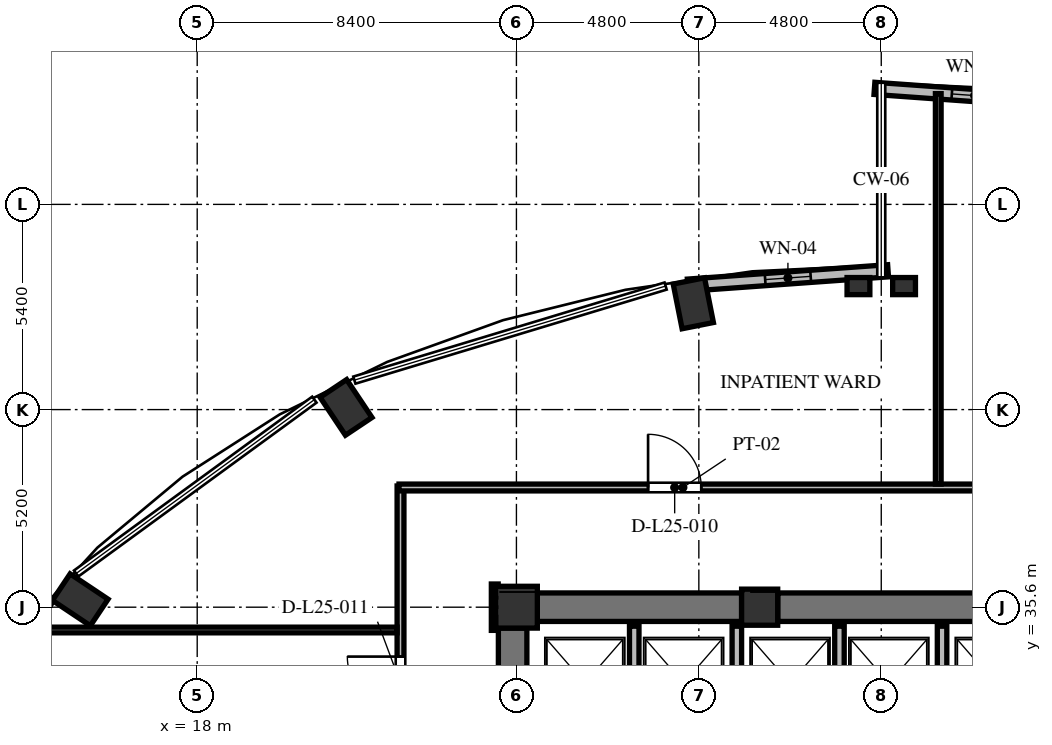
"""IFC4 building model, lengths in metres.
Left out: names, types, materials, properties, quantities, classifications, styles, units other than length and angle.
Written with IfcOpenShell. Run it as: python <this file> out.ifc"""

import sys

from ifc_helpers import new_model, si_unit, direction, frame, frame_2d, origin, origin_2d, place, context, subcontext, project, spatial, rectangle, extrude, element, fill, save


model = new_model("IFC4")
c1 = context("Model", 3, precision=1e-05, world=origin(), true_north=direction((0.0, 1.0)))
c2 = subcontext(c1, "Body", "Model", "MODEL_VIEW")
j1 = project(units=[si_unit("LENGTHUNIT", "METRE"), si_unit("PLANEANGLEUNIT", "RADIAN")], contexts=[c1])
p1 = place(None, origin())
s1 = spatial("IfcSite", under=j1, at=p1, CompositionType="ELEMENT")
p2 = place(p1, origin())
s2 = spatial("IfcBuilding", under=s1, at=p2, CompositionType="ELEMENT")
p3 = place(p2, frame((0.0, 0.0, 99.984)))
s3 = spatial("IfcBuildingStorey", under=s2, at=p3, CompositionType="ELEMENT", Elevation=99.984)
for number, where, z_axis, x_axis in (
    (1, (31.054, 43.597, 0.0), (0.0, 0.0, 1.0), (-0.195, 0.981, 0.0)),
    (2, (21.916, 40.857, 0.0), (0.0, 0.0, 1.0), (-0.556, 0.831, 0.0)),
    (3, (14.922, 35.795, 0.0), (0.0, 0.0, 1.0), (-0.831, 0.556, 0.0)),
):
    element("IfcColumn", number, at=place(p3, frame(where, z_axis=z_axis, x_axis=x_axis)), inside=s3, PredefinedType="COLUMN", context=c2, shape_type="SweptSolid", body=[
        extrude(rectangle(XDim=1.2, YDim=0.84, at=origin_2d()), origin(), (0.0, 0.0, 1.0), 3.648),
    ])
p4 = place(p3, frame((32.8, 35.6, 0.0), z_axis=(0.0, 0.0, 1.0), x_axis=(1.0, 0.0, 0.0)))
e4 = element("IfcColumn", 4, at=p4, inside=s3, PredefinedType="COLUMN", context=c2, shape_type="SweptSolid", body=[
    extrude(rectangle(XDim=0.95, YDim=0.95, at=origin_2d()), origin(), (0.0, 0.0, 1.0), 3.648),
])
p5 = place(p3, frame((26.4, 35.6, 0.0), z_axis=(0.0, 0.0, 1.0), x_axis=(1.0, 0.0, 0.0)))
e5 = element("IfcColumn", 5, at=p5, inside=s3, PredefinedType="COLUMN", context=c2, shape_type="SweptSolid", body=[
    extrude(rectangle(XDim=1.1, YDim=1.1, at=origin_2d()), origin(), (0.0, 0.0, 1.0), 3.648),
])
for number, where, z_axis, x_axis in (
    (6, (35.4, 44.05, 0.0), (0.0, 0.0, 1.0), (1.0, 0.0, 0.0)),
    (7, (36.6, 44.05, 0.0), (0.0, 0.0, 1.0), (1.0, 0.0, 0.0)),
):
    element("IfcColumn", number, at=place(p3, frame(where, z_axis=z_axis, x_axis=x_axis)), inside=s3, PredefinedType="PILASTER", context=c2, shape_type="SweptSolid", body=[
        extrude(rectangle(XDim=0.6, YDim=0.45, at=origin_2d()), origin(), (0.0, 0.0, 1.0), 3.648),
    ])
p6 = place(p3, frame((26.3, 20.95, 0.0), z_axis=(0.0, 0.0, 1.0), x_axis=(0.0, 1.0, 0.0)))
e8 = element("IfcWall", 8, at=p6, inside=s3, PredefinedType="SHEAR", context=c2, shape_type="SweptSolid", body=[
    extrude(rectangle(XDim=14.1, YDim=0.75, at=frame_2d((7.05, 0.0))), origin(), (0.0, 0.0, 1.0), 3.648),
])
p7 = place(p6, frame((6.5, 0.0, 0.0)))
e9 = element("IfcOpeningElement", 9, at=p7, cuts=e8, PredefinedType="OPENING", context=c2, shape_type="SweptSolid", body=[
    extrude(rectangle(XDim=1.2, YDim=2.15, at=frame_2d((0.6, 1.075))), frame((0.0, 0.385, 0.0), z_axis=(0.0, -1.0, 0.0), x_axis=(1.0, 0.0, 0.0)), (0.0, 0.0, 1.0), 0.77),
])
p8 = place(p6, frame((9.6, 0.0, 0.0)))
e10 = element("IfcOpeningElement", 10, at=p8, cuts=e8, PredefinedType="OPENING", context=c2, shape_type="SweptSolid", body=[
    extrude(rectangle(XDim=1.3, YDim=2.2, at=frame_2d((0.65, 1.1))), frame((0.0, 0.385, 0.0), z_axis=(0.0, -1.0, 0.0), x_axis=(1.0, 0.0, 0.0)), (0.0, 0.0, 1.0), 0.77),
])
p9 = place(p6, frame((3.26, 0.0, 0.0)))
e11 = element("IfcOpeningElement", 11, at=p9, cuts=e8, PredefinedType="OPENING", context=c2, shape_type="SweptSolid", body=[
    extrude(rectangle(XDim=1.3, YDim=2.2, at=frame_2d((0.65, 1.1))), frame((0.0, 0.385, 0.0), z_axis=(0.0, -1.0, 0.0), x_axis=(1.0, 0.0, 0.0)), (0.0, 0.0, 1.0), 0.77),
])
p10 = place(p3, frame((26.95, 35.6, 0.0), z_axis=(0.0, 0.0, 1.0), x_axis=(1.0, 0.0, 0.0)))
e12 = element("IfcWall", 12, at=p10, inside=s3, PredefinedType="SHEAR", context=c2, shape_type="SweptSolid", body=[
    extrude(rectangle(XDim=5.375, YDim=0.75, at=frame_2d((2.688, 0.0))), origin(), (0.0, 0.0, 1.0), 3.648),
])
p11 = place(p3, frame((33.275, 35.6, 0.0), z_axis=(0.0, 0.0, 1.0), x_axis=(1.0, 0.0, 0.0)))
e13 = element("IfcWall", 13, at=p11, inside=s3, PredefinedType="SHEAR", context=c2, shape_type="SweptSolid", body=[
    extrude(rectangle(XDim=5.45, YDim=0.75, at=frame_2d((2.725, 0.0))), origin(), (0.0, 0.0, 1.0), 3.648),
])
p12 = place(p3, frame((41.091, 48.875, 0.0), z_axis=(0.0, 0.0, 1.0), x_axis=(-0.997432364291, 0.071614793619, 0.0)))
e14 = element("IfcWall", 14, at=p12, inside=s3, PredefinedType="SOLIDWALL", context=c2, shape_type="SweptSolid", body=[
    extrude(rectangle(XDim=5.284, YDim=0.32, at=frame_2d((2.642, 0.0))), origin(), (0.0, 0.0, 1.0), 3.428),
])
p13 = place(p12, frame((2.042, 0.0, 0.85)))
e15 = element("IfcOpeningElement", 15, at=p13, cuts=e14, PredefinedType="OPENING", context=c2, shape_type="SweptSolid", body=[
    extrude(rectangle(XDim=1.2, YDim=2.2, at=frame_2d((0.6, 1.1))), frame((0.0, 0.17, 0.0), z_axis=(0.0, -1.0, 0.0), x_axis=(1.0, 0.0, 0.0)), (0.0, 0.0, 1.0), 0.34),
])
p14 = place(p3, frame((36.179, 44.453, 0.0), z_axis=(0.0, 0.0, 1.0), x_axis=(-0.997431890304, -0.071621394884, 0.0)))
e16 = element("IfcWall", 16, at=p14, inside=s3, PredefinedType="SOLIDWALL", context=c2, shape_type="SweptSolid", body=[
    extrude(rectangle(XDim=5.284, YDim=0.32, at=frame_2d((2.642, 0.0))), origin(), (0.0, 0.0, 1.0), 3.428),
])
p15 = place(p14, frame((2.042, 0.0, 0.85)))
e17 = element("IfcOpeningElement", 17, at=p15, cuts=e16, PredefinedType="OPENING", context=c2, shape_type="SweptSolid", body=[
    extrude(rectangle(XDim=1.2, YDim=1.8, at=frame_2d((0.6, 0.9))), frame((0.0, 0.17, 0.0), z_axis=(0.0, -1.0, 0.0), x_axis=(1.0, 0.0, 0.0)), (0.0, 0.0, 1.0), 0.34),
])
for number, where, z_axis, x_axis in (
    (18, (29.5, 32.42, 0.0), (0.0, 0.0, 1.0), (0.0, 1.0, 0.0)),
    (19, (32.2, 32.42, 0.0), (0.0, 0.0, 1.0), (0.0, 1.0, 0.0)),
    (20, (34.9, 32.42, 0.0), (0.0, 0.0, 1.0), (0.0, 1.0, 0.0)),
    (21, (37.6, 32.42, 0.0), (0.0, 0.0, 1.0), (0.0, 1.0, 0.0)),
):
    element("IfcWall", number, at=place(p3, frame(where, z_axis=z_axis, x_axis=x_axis)), inside=s3, PredefinedType="SOLIDWALL", context=c2, shape_type="SweptSolid", body=[
        extrude(rectangle(XDim=2.68, YDim=0.25, at=frame_2d((1.34, 0.0))), origin(), (0.0, 0.0, 1.0), 3.428),
    ])
p16 = place(p3, frame((23.35, 29.36, 0.0), z_axis=(0.0, 0.0, 1.0), x_axis=(0.0, 1.0, 0.0)))
e22 = element("IfcWall", 22, at=p16, inside=s3, PredefinedType="PARTITIONING", context=c2, shape_type="SweptSolid", body=[
    extrude(rectangle(XDim=9.43, YDim=0.18, at=frame_2d((4.715, 0.0))), origin(), (0.0, 0.0, 1.0), 3.428),
])
p17 = place(p16, frame((3.54, 0.0, 0.0)))
e23 = element("IfcOpeningElement", 23, at=p17, cuts=e22, PredefinedType="OPENING", context=c2, shape_type="SweptSolid", body=[
    extrude(rectangle(XDim=1.4, YDim=2.2, at=frame_2d((0.7, 1.1))), frame((0.0, 0.1, 0.0), z_axis=(0.0, -1.0, 0.0), x_axis=(1.0, 0.0, 0.0)), (0.0, 0.0, 1.0), 0.2),
])
p18 = place(p3, frame((23.31, 38.75, 0.0), z_axis=(0.0, 0.0, 1.0), x_axis=(1.0, 0.0, 0.0)))
e24 = element("IfcWall", 24, at=p18, inside=s3, PredefinedType="PARTITIONING", context=c2, shape_type="SweptSolid", body=[
    extrude(rectangle(XDim=29.88, YDim=0.18, at=frame_2d((14.94, 0.0))), origin(), (0.0, 0.0, 1.0), 3.053),
])
p19 = place(p18, frame((21.351, 0.0, 0.0)))
e25 = element("IfcOpeningElement", 25, at=p19, cuts=e24, PredefinedType="OPENING", context=c2, shape_type="SweptSolid", body=[
    extrude(rectangle(XDim=1.05, YDim=2.15, at=frame_2d((0.525, 1.075))), frame((0.0, 0.1, 0.0), z_axis=(0.0, -1.0, 0.0), x_axis=(1.0, 0.0, 0.0)), (0.0, 0.0, 1.0), 0.2),
])
p20 = place(p18, frame((6.554, 0.0, 0.0)))
e26 = element("IfcOpeningElement", 26, at=p20, cuts=e24, PredefinedType="OPENING", context=c2, shape_type="SweptSolid", body=[
    extrude(rectangle(XDim=1.4, YDim=2.2, at=frame_2d((0.7, 1.1))), frame((0.0, 0.1, 0.0), z_axis=(0.0, -1.0, 0.0), x_axis=(1.0, 0.0, 0.0)), (0.0, 0.0, 1.0), 0.2),
])
p21 = place(p3, frame((25.83, 36.21, 0.0), z_axis=(0.0, 0.0, 1.0), x_axis=(0.0, -1.0, 0.0)))
e27 = element("IfcWall", 27, at=p21, inside=s3, PredefinedType="PARTITIONING", context=c2, shape_type="SweptSolid", body=[
    extrude(rectangle(XDim=1.22, YDim=0.18, at=frame_2d((0.61, 0.0))), origin(), (0.0, 0.0, 1.0), 3.428),
])
p22 = place(p3, frame((13.71, 35.0, 0.0), z_axis=(0.0, 0.0, 1.0), x_axis=(1.0, 0.0, 0.0)))
e28 = element("IfcWall", 28, at=p22, inside=s3, PredefinedType="PARTITIONING", context=c2, shape_type="SweptSolid", body=[
    extrude(rectangle(XDim=9.55, YDim=0.15, at=frame_2d((4.775, 0.0))), origin(), (0.0, 0.0, 1.0), 3.428),
])
p23 = place(p3, frame((37.5, 38.84, 0.0), z_axis=(0.0, 0.0, 1.0), x_axis=(0.0, 1.0, 0.0)))
e29 = element("IfcWall", 29, at=p23, inside=s3, PredefinedType="PARTITIONING", context=c2, shape_type="SweptSolid", body=[
    extrude(rectangle(XDim=10.274, YDim=0.15, at=frame_2d((5.137, 0.0))), origin(), (0.0, 0.0, 1.0), 3.428),
])
p24 = place(p13, origin())
e30 = element("IfcWindow", 30, at=p24, inside=s3, PartitioningType="SINGLE_PANEL", PredefinedType="WINDOW", context=c2, shape_type="SweptSolid", body=[
    extrude(rectangle(XDim=1.2, YDim=2.2, at=frame_2d((0.6, 1.1))), frame((0.0, 0.03, 0.0), z_axis=(0.0, -1.0, 0.0), x_axis=(1.0, 0.0, 0.0)), (0.0, 0.0, 1.0), 0.06),
])
fill(e15, e30)
p25 = place(p15, origin())
e31 = element("IfcWindow", 31, at=p25, inside=s3, PartitioningType="SINGLE_PANEL", PredefinedType="WINDOW", context=c2, shape_type="SweptSolid", body=[
    extrude(rectangle(XDim=1.2, YDim=1.8, at=frame_2d((0.6, 0.9))), frame((0.0, 0.03, 0.0), z_axis=(0.0, -1.0, 0.0), x_axis=(1.0, 0.0, 0.0)), (0.0, 0.0, 1.0), 0.06),
])
fill(e17, e31)
p26 = place(p20, origin())
e32 = element("IfcDoor", 32, at=p26, inside=s3, OperationType="SINGLE_SWING_LEFT", PredefinedType="DOOR", context=c2, shape_type="SweptSolid", body=[
    extrude(rectangle(XDim=1.4, YDim=2.2, at=frame_2d((0.7, 1.1))), frame((0.0, 0.025, 0.0), z_axis=(0.0, -1.0, 0.0), x_axis=(1.0, 0.0, 0.0)), (0.0, 0.0, 1.0), 0.05),
])
fill(e26, e32)
p27 = place(p17, origin())
e33 = element("IfcDoor", 33, at=p27, inside=s3, OperationType="SINGLE_SWING_RIGHT", PredefinedType="DOOR", context=c2, shape_type="SweptSolid", body=[
    extrude(rectangle(XDim=1.4, YDim=2.2, at=frame_2d((0.7, 1.1))), frame((0.0, 0.025, 0.0), z_axis=(0.0, -1.0, 0.0), x_axis=(1.0, 0.0, 0.0)), (0.0, 0.0, 1.0), 0.05),
])
fill(e23, e33)
save(model, sys.argv[1])
